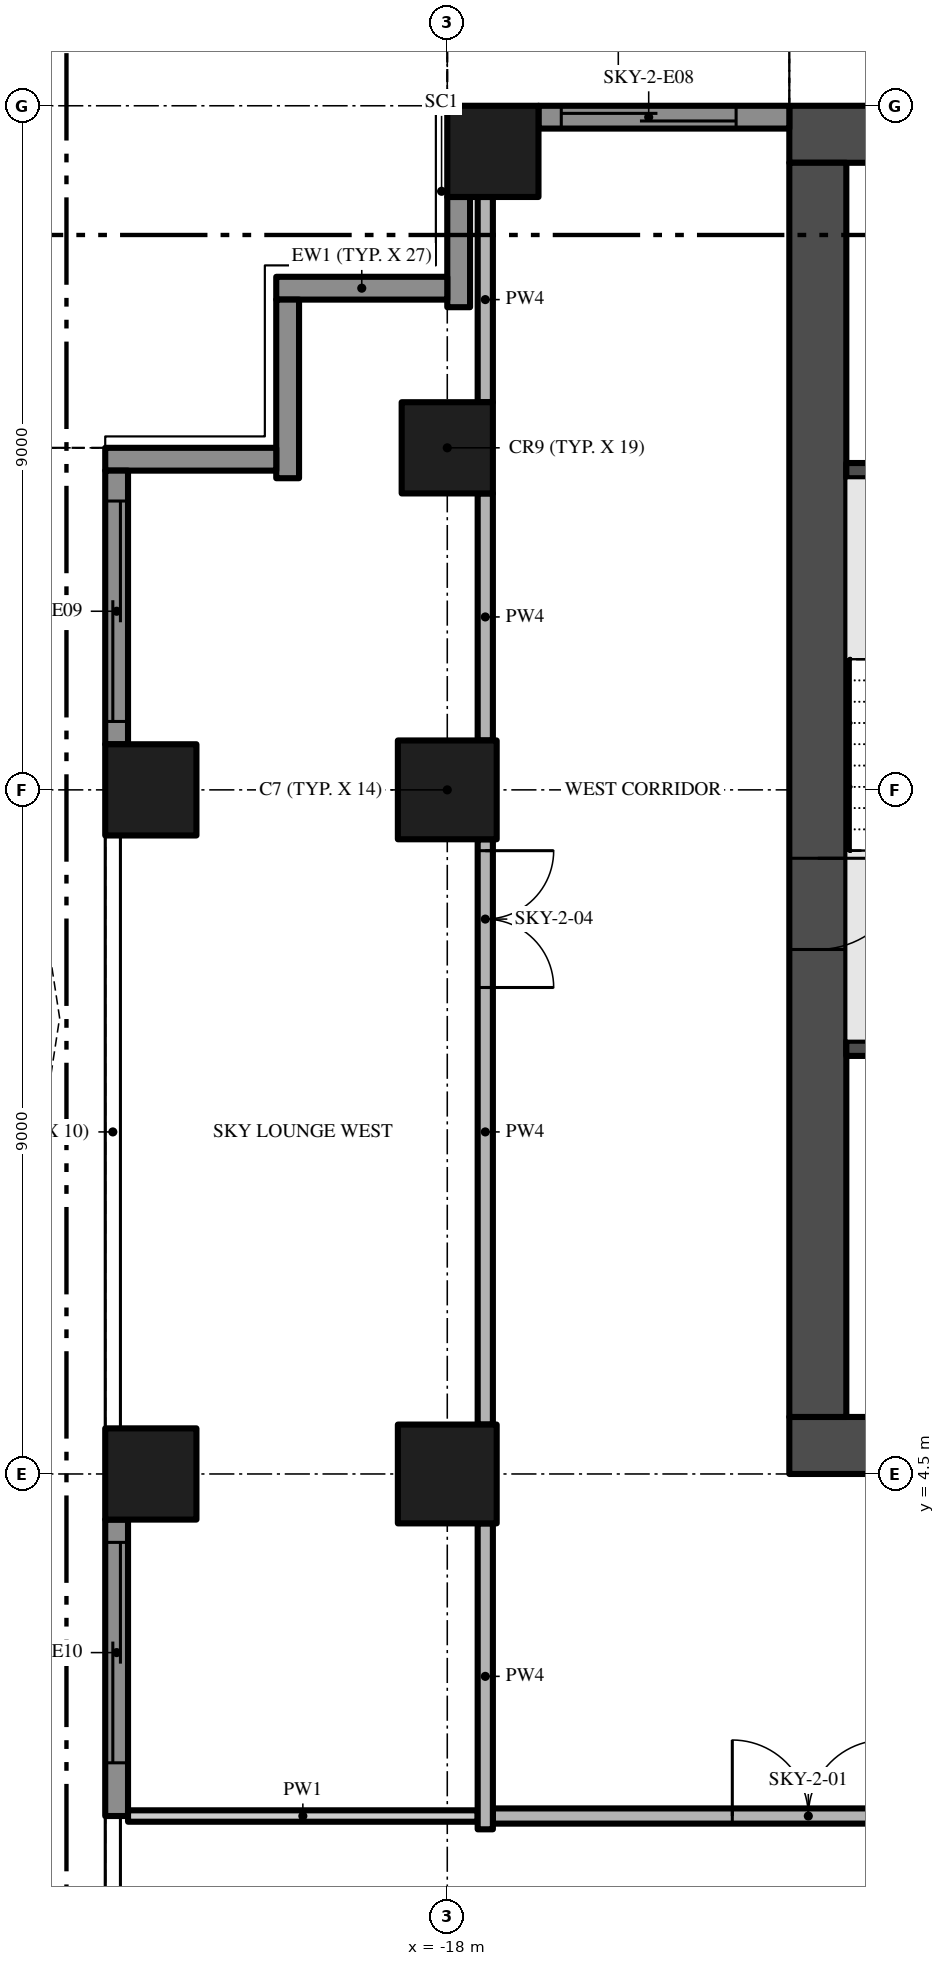
"""IFC4 building model, lengths in metres.
Left out: names, types, materials, properties, quantities, classifications, styles, units other than length and angle.
Written with IfcOpenShell. Run it as: python <this file> out.ifc"""

import sys

from ifc_helpers import new_model, si_unit, direction, frame, frame_2d, origin, origin_2d, place, context, subcontext, project, spatial, polyline, rectangle, outline, extrude, element, fill, save


model = new_model("IFC4")
c1 = context("Model", 3, precision=1e-05, world=origin(), true_north=direction((0.0, 1.0)))
c2 = subcontext(c1, "Body", "Model", "MODEL_VIEW")
j1 = project(units=[si_unit("LENGTHUNIT", "METRE"), si_unit("PLANEANGLEUNIT", "RADIAN")], contexts=[c1])
p1 = place(None, origin())
s1 = spatial("IfcSite", under=j1, at=p1, CompositionType="ELEMENT")
p2 = place(p1, origin())
s2 = spatial("IfcBuilding", under=s1, at=p2, CompositionType="ELEMENT")
p3 = place(p2, frame((0.0, 0.0, 120.0)))
s3 = spatial("IfcBuildingStorey", under=s2, at=p3, CompositionType="ELEMENT", Elevation=120.0)
p4 = place(p3, frame((-13.5, 4.875, -0.3), z_axis=(0.0, 0.0, 1.0), x_axis=(1.0, 0.0, 0.0)))
e1 = element("IfcWall", 1, at=p4, inside=s3, PredefinedType="SHEAR", context=c2, shape_type="SweptSolid", body=[
    extrude(rectangle(XDim=27.0, YDim=0.75, at=frame_2d((13.5, 0.0))), origin(), (0.0, 0.0, 1.0), 5.0),
])
p5 = place(p4, frame((12.0, 0.0, 0.3)))
e2 = element("IfcOpeningElement", 2, at=p5, cuts=e1, PredefinedType="OPENING", context=c2, shape_type="SweptSolid", body=[
    extrude(rectangle(XDim=3.0, YDim=2.4, at=frame_2d((1.5, 1.2))), frame((0.0, 0.385, 0.0), z_axis=(0.0, -1.0, 0.0), x_axis=(1.0, 0.0, 0.0)), (0.0, 0.0, 1.0), 0.77),
])
p6 = place(p4, frame((4.9, 0.0, 0.3)))
e3 = element("IfcOpeningElement", 3, at=p6, cuts=e1, PredefinedType="OPENING", context=c2, shape_type="SweptSolid", body=[
    extrude(rectangle(XDim=1.2, YDim=2.2, at=frame_2d((0.6, 1.1))), frame((0.0, 0.385, 0.0), z_axis=(0.0, -1.0, 0.0), x_axis=(1.0, 0.0, 0.0)), (0.0, 0.0, 1.0), 0.77),
])
p7 = place(p4, frame((20.75, 0.0, 0.3)))
e4 = element("IfcOpeningElement", 4, at=p7, cuts=e1, PredefinedType="OPENING", context=c2, shape_type="SweptSolid", body=[
    extrude(rectangle(XDim=1.5, YDim=2.2, at=frame_2d((0.75, 1.1))), frame((0.0, 0.385, 0.0), z_axis=(0.0, -1.0, 0.0), x_axis=(1.0, 0.0, 0.0)), (0.0, 0.0, 1.0), 0.77),
])
p8 = place(p4, frame((17.4, 0.0, 0.3)))
e5 = element("IfcOpeningElement", 5, at=p8, cuts=e1, PredefinedType="OPENING", context=c2, shape_type="SweptSolid", body=[
    extrude(rectangle(XDim=1.2, YDim=2.2, at=frame_2d((0.6, 1.1))), frame((0.0, 0.385, 0.0), z_axis=(0.0, -1.0, 0.0), x_axis=(1.0, 0.0, 0.0)), (0.0, 0.0, 1.0), 0.77),
])
p9 = place(p3, frame((13.5, 22.125, -0.3), z_axis=(0.0, 0.0, 1.0), x_axis=(-1.0, 0.0, 0.0)))
e6 = element("IfcWall", 6, at=p9, inside=s3, PredefinedType="SHEAR", context=c2, shape_type="SweptSolid", body=[
    extrude(rectangle(XDim=27.0, YDim=0.75, at=frame_2d((13.5, 0.0))), origin(), (0.0, 0.0, 1.0), 5.0),
])
p10 = place(p3, frame((-13.125, 21.75, -0.3), z_axis=(0.0, 0.0, 1.0), x_axis=(0.0, -1.0, 0.0)))
e7 = element("IfcWall", 7, at=p10, inside=s3, PredefinedType="SHEAR", context=c2, shape_type="SweptSolid", body=[
    extrude(rectangle(XDim=16.5, YDim=0.75, at=frame_2d((8.25, 0.0))), origin(), (0.0, 0.0, 1.0), 5.0),
])
p11 = place(p10, frame((9.15, 0.0, 0.3)))
e8 = element("IfcOpeningElement", 8, at=p11, cuts=e7, PredefinedType="OPENING", context=c2, shape_type="SweptSolid", body=[
    extrude(rectangle(XDim=1.2, YDim=2.2, at=frame_2d((0.6, 1.1))), frame((0.0, 0.385, 0.0), z_axis=(0.0, -1.0, 0.0), x_axis=(1.0, 0.0, 0.0)), (0.0, 0.0, 1.0), 0.77),
])
p12 = place(p3, frame((-18.0, 13.5, 0.0), z_axis=(0.0, 0.0, 1.0), x_axis=(1.0, 0.0, 0.0)))
e9 = element("IfcColumn", 9, at=p12, inside=s3, PredefinedType="COLUMN", context=c2, shape_type="SweptSolid", body=[
    extrude(rectangle(XDim=1.3, YDim=1.3, at=origin_2d()), origin(), (0.0, 0.0, 1.0), 4.7),
])
p13 = place(p3, frame((-17.4, 21.9, 0.0), z_axis=(0.0, 0.0, 1.0), x_axis=(1.0, 0.0, 0.0)))
e10 = element("IfcColumn", 10, at=p13, inside=s3, PredefinedType="COLUMN", context=c2, shape_type="SweptSolid", body=[
    extrude(rectangle(XDim=1.2, YDim=1.2, at=origin_2d()), origin(), (0.0, 0.0, 1.0), 4.7),
])
p14 = place(p3, frame((-18.0, 4.5, 0.0), z_axis=(0.0, 0.0, 1.0), x_axis=(1.0, 0.0, 0.0)))
e11 = element("IfcColumn", 11, at=p14, inside=s3, PredefinedType="COLUMN", context=c2, shape_type="SweptSolid", body=[
    extrude(rectangle(XDim=1.3, YDim=1.3, at=origin_2d()), origin(), (0.0, 0.0, 1.0), 4.7),
])
for number, where, z_axis, x_axis in (
    (12, (-21.9, 13.5, 0.0), (0.0, 0.0, 1.0), (1.0, 0.0, 0.0)),
    (13, (-18.0, 18.0, 0.0), (0.0, 0.0, 1.0), (1.0, 0.0, 0.0)),
    (14, (-21.9, 4.5, 0.0), (0.0, 0.0, 1.0), (1.0, 0.0, 0.0)),
):
    element("IfcColumn", number, at=place(p3, frame(where, z_axis=z_axis, x_axis=x_axis)), inside=s3, PredefinedType="COLUMN", context=c2, shape_type="SweptSolid", body=[
        extrude(rectangle(XDim=1.2, YDim=1.2, at=origin_2d()), origin(), (0.0, 0.0, 1.0), 4.7),
    ])
p15 = place(p3, frame((-16.8, 22.35, 0.0), z_axis=(0.0, 0.0, 1.0), x_axis=(1.0, 0.0, 0.0)))
e15 = element("IfcWall", 15, at=p15, inside=s3, PredefinedType="SOLIDWALL", context=c2, shape_type="SweptSolid", body=[
    extrude(rectangle(XDim=3.3, YDim=0.3, at=frame_2d((1.65, 0.0))), origin(), (0.0, 0.0, 1.0), 4.7),
])
p16 = place(p15, frame((0.3, 0.0, 0.0)))
e16 = element("IfcOpeningElement", 16, at=p16, cuts=e15, PredefinedType="OPENING", context=c2, shape_type="SweptSolid", body=[
    extrude(rectangle(XDim=2.3, YDim=2.4, at=frame_2d((1.15, 1.2))), frame((0.0, 0.16, 0.0), z_axis=(0.0, -1.0, 0.0), x_axis=(1.0, 0.0, 0.0)), (0.0, 0.0, 1.0), 0.32),
])
p17 = place(p3, frame((-17.85, 19.85, 0.0), z_axis=(0.0, 0.0, 1.0), x_axis=(0.0, 1.0, 0.0)))
e17 = element("IfcWall", 17, at=p17, inside=s3, PredefinedType="SOLIDWALL", context=c2, shape_type="SweptSolid", body=[
    extrude(rectangle(XDim=1.45, YDim=0.3, at=frame_2d((0.725, 0.0))), origin(), (0.0, 0.0, 1.0), 4.7),
])
p18 = place(p3, frame((-20.25, 20.1, 0.0), z_axis=(0.0, 0.0, 1.0), x_axis=(1.0, 0.0, 0.0)))
e18 = element("IfcWall", 18, at=p18, inside=s3, PredefinedType="SOLIDWALL", context=c2, shape_type="SweptSolid", body=[
    extrude(rectangle(XDim=2.25, YDim=0.3, at=frame_2d((1.125, 0.0))), origin(), (0.0, 0.0, 1.0), 4.7),
])
p19 = place(p3, frame((-20.1, 17.6, 0.0), z_axis=(0.0, 0.0, 1.0), x_axis=(0.0, 1.0, 0.0)))
e19 = element("IfcWall", 19, at=p19, inside=s3, PredefinedType="SOLIDWALL", context=c2, shape_type="SweptSolid", body=[
    extrude(rectangle(XDim=2.35, YDim=0.3, at=frame_2d((1.175, 0.0))), origin(), (0.0, 0.0, 1.0), 4.7),
])
p20 = place(p3, frame((-22.5, 17.85, 0.0), z_axis=(0.0, 0.0, 1.0), x_axis=(1.0, 0.0, 0.0)))
e20 = element("IfcWall", 20, at=p20, inside=s3, PredefinedType="SOLIDWALL", context=c2, shape_type="SweptSolid", body=[
    extrude(rectangle(XDim=2.25, YDim=0.3, at=frame_2d((1.125, 0.0))), origin(), (0.0, 0.0, 1.0), 4.7),
])
p21 = place(p3, frame((-22.35, 14.1, 0.0), z_axis=(0.0, 0.0, 1.0), x_axis=(0.0, 1.0, 0.0)))
e21 = element("IfcWall", 21, at=p21, inside=s3, PredefinedType="SOLIDWALL", context=c2, shape_type="SweptSolid", body=[
    extrude(rectangle(XDim=3.6, YDim=0.3, at=frame_2d((1.8, 0.0))), origin(), (0.0, 0.0, 1.0), 4.7),
])
p22 = place(p21, frame((0.3, 0.0, 0.0)))
e22 = element("IfcOpeningElement", 22, at=p22, cuts=e21, PredefinedType="OPENING", context=c2, shape_type="SweptSolid", body=[
    extrude(rectangle(XDim=2.9, YDim=2.4, at=frame_2d((1.45, 1.2))), frame((0.0, 0.16, 0.0), z_axis=(0.0, -1.0, 0.0), x_axis=(1.0, 0.0, 0.0)), (0.0, 0.0, 1.0), 0.32),
])
p23 = place(p3, frame((-22.35, 0.0, 0.0), z_axis=(0.0, 0.0, 1.0), x_axis=(0.0, 1.0, 0.0)))
e23 = element("IfcWall", 23, at=p23, inside=s3, PredefinedType="SOLIDWALL", context=c2, shape_type="SweptSolid", body=[
    extrude(rectangle(XDim=3.9, YDim=0.3, at=frame_2d((1.95, 0.0))), origin(), (0.0, 0.0, 1.0), 4.7),
])
p24 = place(p23, frame((0.7, 0.0, 0.0)))
e24 = element("IfcOpeningElement", 24, at=p24, cuts=e23, PredefinedType="OPENING", context=c2, shape_type="SweptSolid", body=[
    extrude(rectangle(XDim=2.9, YDim=2.4, at=frame_2d((1.45, 1.2))), frame((0.0, 0.16, 0.0), z_axis=(0.0, -1.0, 0.0), x_axis=(1.0, 0.0, 0.0)), (0.0, 0.0, 1.0), 0.32),
])
p25 = place(p3, origin())
e25 = element("IfcWall", 25, at=p25, inside=s3, PredefinedType="USERDEFINED", context=c2, shape_type="SweptSolid", body=[
    extrude(outline(polyline([(-25.5, 18.0), (-25.271, 16.5), (-24.671, 15.0), (-23.929, 13.5), (-23.329, 12.0), (-23.1, 10.5), (-23.329, 9.0), (-23.929, 7.5), (-24.671, 6.0), (-25.271, 4.5), (-25.5, 3.0), (-25.271, 1.5), (-24.671, 0.0), (-23.929, -1.5), (-23.329, -3.0), (-23.1, -4.5), (-23.329, -6.0), (-23.929, -7.5), (-24.671, -9.0), (-25.271, -10.5), (-25.5, -12.0), (-25.271, -13.5), (-25.024, -13.462), (-25.247, -12.0), (-25.028, -10.566), (-24.442, -9.102), (-23.701, -7.602), (-23.086, -6.066), (-22.847, -4.5), (-23.086, -2.934), (-23.701, -1.398), (-24.442, 0.102), (-25.028, 1.566), (-25.247, 3.0), (-25.028, 4.434), (-24.442, 5.898), (-23.701, 7.398), (-23.086, 8.934), (-22.847, 10.5), (-23.086, 12.066), (-23.701, 13.602), (-24.442, 15.102), (-25.028, 16.566), (-25.253, 18.038), (-25.5, 18.0)])), origin(), (0.0, 0.0, 1.0), 0.9),
])
for number, where, z_axis, x_axis in (
    (26, (-12.75, 10.1, 0.0), (0.0, 0.0, 1.0), (1.0, 0.0, 0.0)),
    (27, (-12.75, 17.7, 0.0), (0.0, 0.0, 1.0), (1.0, 0.0, 0.0)),
):
    element("IfcWall", number, at=place(p3, frame(where, z_axis=z_axis, x_axis=x_axis)), inside=s3, PredefinedType="SHEAR", context=c2, shape_type="SweptSolid", body=[
        extrude(rectangle(XDim=3.1, YDim=0.2, at=frame_2d((1.55, 0.0))), origin(), (0.0, 0.0, 1.0), 4.7),
    ])
p26 = place(p3, frame((-17.4, 0.0, 0.0), z_axis=(0.0, 0.0, 1.0), x_axis=(1.0, 0.0, 0.0)))
e28 = element("IfcWall", 28, at=p26, inside=s3, PredefinedType="PARTITIONING", context=c2, shape_type="SweptSolid", body=[
    extrude(rectangle(XDim=34.8, YDim=0.2, at=frame_2d((17.4, 0.0))), origin(), (0.0, 0.0, 1.0), 4.7),
])
p27 = place(p26, frame((3.15, 0.0, 0.0)))
e29 = element("IfcOpeningElement", 29, at=p27, cuts=e28, PredefinedType="OPENING", context=c2, shape_type="SweptSolid", body=[
    extrude(rectangle(XDim=2.0, YDim=2.4, at=frame_2d((1.0, 1.2))), frame((0.0, 0.11, 0.0), z_axis=(0.0, -1.0, 0.0), x_axis=(1.0, 0.0, 0.0)), (0.0, 0.0, 1.0), 0.22),
])
p28 = place(p26, frame((16.4, 0.0, 0.0)))
e30 = element("IfcOpeningElement", 30, at=p28, cuts=e28, PredefinedType="OPENING", context=c2, shape_type="SweptSolid", body=[
    extrude(rectangle(XDim=2.0, YDim=2.4, at=frame_2d((1.0, 1.2))), frame((0.0, 0.11, 0.0), z_axis=(0.0, -1.0, 0.0), x_axis=(1.0, 0.0, 0.0)), (0.0, 0.0, 1.0), 0.22),
])
p29 = place(p26, frame((29.65, 0.0, 0.0)))
e31 = element("IfcOpeningElement", 31, at=p29, cuts=e28, PredefinedType="OPENING", context=c2, shape_type="SweptSolid", body=[
    extrude(rectangle(XDim=2.0, YDim=2.4, at=frame_2d((1.0, 1.2))), frame((0.0, 0.11, 0.0), z_axis=(0.0, -1.0, 0.0), x_axis=(1.0, 0.0, 0.0)), (0.0, 0.0, 1.0), 0.22),
])
p30 = place(p3, frame((-22.2, 0.0, 0.0), z_axis=(0.0, 0.0, 1.0), x_axis=(1.0, 0.0, 0.0)))
e32 = element("IfcWall", 32, at=p30, inside=s3, PredefinedType="PARTITIONING", context=c2, shape_type="SweptSolid", body=[
    extrude(rectangle(XDim=4.6, YDim=0.15, at=frame_2d((2.3, 0.0))), origin(), (0.0, 0.0, 1.0), 4.7),
])
p31 = place(p3, frame((-17.5, -0.175, 0.0), z_axis=(0.0, 0.0, 1.0), x_axis=(0.0, 1.0, 0.0)))
e33 = element("IfcWall", 33, at=p31, inside=s3, PredefinedType="PARTITIONING", context=c2, shape_type="SweptSolid", body=[
    extrude(rectangle(XDim=4.025, YDim=0.2, at=frame_2d((2.013, 0.0))), origin(), (0.0, 0.0, 1.0), 4.7),
])
p32 = place(p3, frame((-17.5, 12.85, 0.0), z_axis=(0.0, 0.0, 1.0), x_axis=(0.0, -1.0, 0.0)))
e34 = element("IfcWall", 34, at=p32, inside=s3, PredefinedType="PARTITIONING", context=c2, shape_type="SweptSolid", body=[
    extrude(rectangle(XDim=7.7, YDim=0.2, at=frame_2d((3.85, 0.0))), origin(), (0.0, 0.0, 1.0), 4.7),
])
p33 = place(p32, frame((0.15, 0.0, 0.0)))
e35 = element("IfcOpeningElement", 35, at=p33, cuts=e34, PredefinedType="OPENING", context=c2, shape_type="SweptSolid", body=[
    extrude(rectangle(XDim=1.8, YDim=2.4, at=frame_2d((0.9, 1.2))), frame((0.0, 0.11, 0.0), z_axis=(0.0, -1.0, 0.0), x_axis=(1.0, 0.0, 0.0)), (0.0, 0.0, 1.0), 0.22),
])
p34 = place(p3, frame((-17.5, 14.15, 0.0), z_axis=(0.0, 0.0, 1.0), x_axis=(0.0, 1.0, 0.0)))
e36 = element("IfcWall", 36, at=p34, inside=s3, PredefinedType="PARTITIONING", context=c2, shape_type="SweptSolid", body=[
    extrude(rectangle(XDim=3.25, YDim=0.2, at=frame_2d((1.625, 0.0))), origin(), (0.0, 0.0, 1.0), 4.7),
])
p35 = place(p3, frame((-17.5, 18.6, 0.0), z_axis=(0.0, 0.0, 1.0), x_axis=(0.0, 1.0, 0.0)))
e37 = element("IfcWall", 37, at=p35, inside=s3, PredefinedType="PARTITIONING", context=c2, shape_type="SweptSolid", body=[
    extrude(rectangle(XDim=2.7, YDim=0.2, at=frame_2d((1.35, 0.0))), origin(), (0.0, 0.0, 1.0), 4.7),
])
p36 = place(p16, origin())
e38 = element("IfcDoor", 38, at=p36, inside=s3, OperationType="SINGLE_SWING_LEFT", PredefinedType="DOOR", context=c2, shape_type="SweptSolid", body=[
    extrude(rectangle(XDim=2.3, YDim=2.4, at=frame_2d((1.15, 1.2))), frame((0.0, 0.025, 0.0), z_axis=(0.0, -1.0, 0.0), x_axis=(1.0, 0.0, 0.0)), (0.0, 0.0, 1.0), 0.05),
])
fill(e16, e38)
p37 = place(p22, origin())
e39 = element("IfcDoor", 39, at=p37, inside=s3, OperationType="SINGLE_SWING_LEFT", PredefinedType="DOOR", context=c2, shape_type="SweptSolid", body=[
    extrude(rectangle(XDim=2.9, YDim=2.4, at=frame_2d((1.45, 1.2))), frame((0.0, 0.025, 0.0), z_axis=(0.0, -1.0, 0.0), x_axis=(1.0, 0.0, 0.0)), (0.0, 0.0, 1.0), 0.05),
])
fill(e22, e39)
p38 = place(p24, origin())
e40 = element("IfcDoor", 40, at=p38, inside=s3, OperationType="SINGLE_SWING_LEFT", PredefinedType="DOOR", context=c2, shape_type="SweptSolid", body=[
    extrude(rectangle(XDim=2.9, YDim=2.4, at=frame_2d((1.45, 1.2))), frame((0.0, 0.025, 0.0), z_axis=(0.0, -1.0, 0.0), x_axis=(1.0, 0.0, 0.0)), (0.0, 0.0, 1.0), 0.05),
])
fill(e24, e40)
p39 = place(p11, frame((1.2, 0.0, 0.0), z_axis=(0.0, 0.0, 1.0), x_axis=(-1.0, 0.0, 0.0)))
e41 = element("IfcDoor", 41, at=p39, inside=s3, OperationType="SINGLE_SWING_RIGHT", PredefinedType="DOOR", context=c2, shape_type="SweptSolid", body=[
    extrude(rectangle(XDim=1.2, YDim=2.2, at=frame_2d((0.6, 1.1))), frame((0.0, 0.025, 0.0), z_axis=(0.0, -1.0, 0.0), x_axis=(1.0, 0.0, 0.0)), (0.0, 0.0, 1.0), 0.05),
])
fill(e8, e41)
p40 = place(p27, origin())
e42 = element("IfcDoor", 42, at=p40, inside=s3, OperationType="DOUBLE_DOOR_SINGLE_SWING", PredefinedType="DOOR", context=c2, shape_type="SweptSolid", body=[
    extrude(rectangle(XDim=2.0, YDim=2.4, at=frame_2d((1.0, 1.2))), frame((0.0, 0.025, 0.0), z_axis=(0.0, -1.0, 0.0), x_axis=(1.0, 0.0, 0.0)), (0.0, 0.0, 1.0), 0.05),
])
fill(e29, e42)
p41 = place(p33, origin())
e43 = element("IfcDoor", 43, at=p41, inside=s3, OperationType="DOUBLE_DOOR_SINGLE_SWING", PredefinedType="DOOR", context=c2, shape_type="SweptSolid", body=[
    extrude(rectangle(XDim=1.8, YDim=2.4, at=frame_2d((0.9, 1.2))), frame((0.0, 0.025, 0.0), z_axis=(0.0, -1.0, 0.0), x_axis=(1.0, 0.0, 0.0)), (0.0, 0.0, 1.0), 0.05),
])
fill(e35, e43)
save(model, sys.argv[1])
